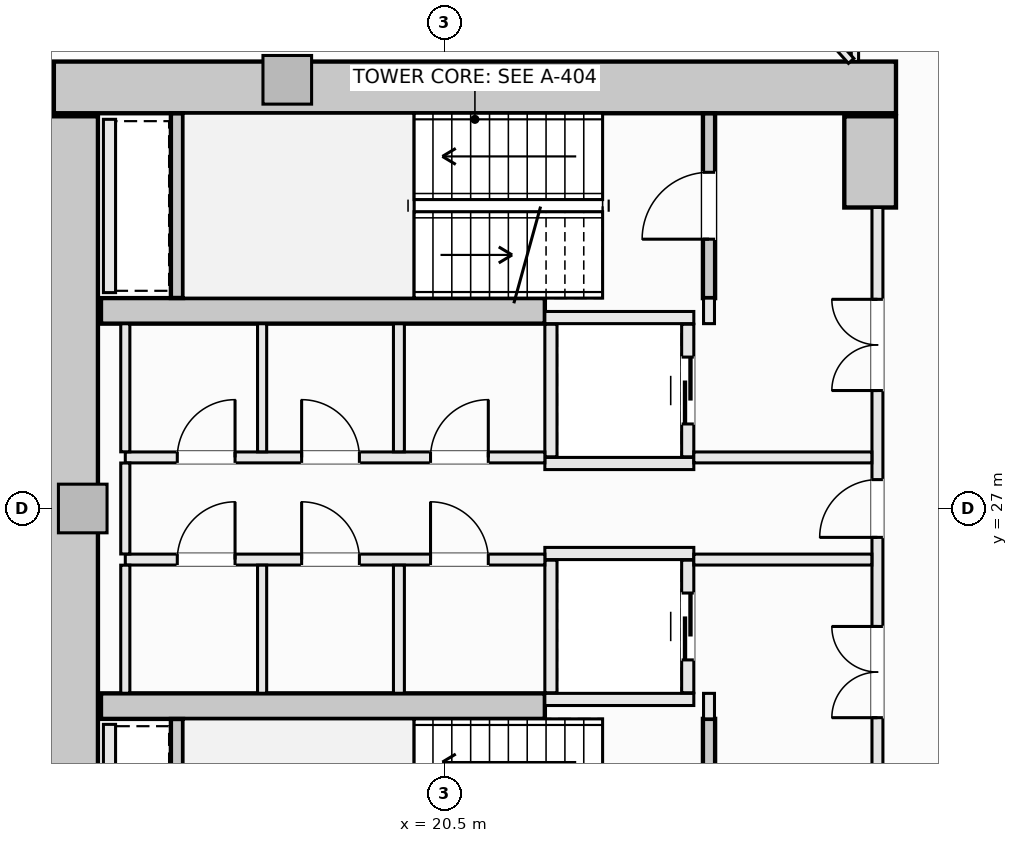
"""IFC4 building model, lengths in metres.
Left out: names, types, materials, properties, quantities, classifications, styles, units other than length and angle.
Written with IfcOpenShell. Run it as: python <this file> out.ifc"""

import sys

from ifc_helpers import new_model, si_unit, direction, frame, frame_2d, origin, origin_2d, place, context, subcontext, project, spatial, rectangle, extrude, element, fill, save


model = new_model("IFC4")
c1 = context("Model", 3, precision=1e-05, world=origin(), true_north=direction((0.0, 1.0)))
c2 = subcontext(c1, "Body", "Model", "MODEL_VIEW")
j1 = project(units=[si_unit("LENGTHUNIT", "METRE"), si_unit("PLANEANGLEUNIT", "RADIAN")], contexts=[c1])
p1 = place(None, origin())
s1 = spatial("IfcSite", under=j1, at=p1, CompositionType="ELEMENT")
p2 = place(p1, origin())
s2 = spatial("IfcBuilding", under=s1, at=p2, CompositionType="ELEMENT")
p3 = place(p2, frame((0.0, 0.0, 88.1)))
s3 = spatial("IfcBuildingStorey", under=s2, at=p3, CompositionType="ELEMENT", Elevation=88.1)
p4 = place(p3, frame((14.075, 33.925, -0.28), z_axis=(0.0, 0.0, 1.0), x_axis=(1.0, 0.0, 0.0)))
e1 = element("IfcWall", 1, at=p4, inside=s3, PredefinedType="SHEAR", context=c2, shape_type="SweptSolid", body=[
    extrude(rectangle(XDim=13.85, YDim=0.85, at=frame_2d((6.925, 0.0))), origin(), (0.0, 0.0, 1.0), 3.85),
])
p5 = place(p3, frame((14.375, 20.55, -0.28), z_axis=(0.0, 0.0, 1.0), x_axis=(0.0, 1.0, 0.0)))
e2 = element("IfcWall", 2, at=p5, inside=s3, PredefinedType="SHEAR", context=c2, shape_type="SweptSolid", body=[
    extrude(rectangle(XDim=12.9, YDim=0.85, at=frame_2d((6.45, 0.0))), origin(), (0.0, 0.0, 1.0), 3.85),
])
p6 = place(p3, frame((27.5, 31.95, -0.28), z_axis=(0.0, 0.0, 1.0), x_axis=(0.0, 1.0, 0.0)))
e3 = element("IfcWall", 3, at=p6, inside=s3, PredefinedType="SHEAR", context=c2, shape_type="SweptSolid", body=[
    extrude(rectangle(XDim=1.5, YDim=0.85, at=frame_2d((0.75, 0.0))), origin(), (0.0, 0.0, 1.0), 3.85),
])
for number, where, z_axis, x_axis in (
    (4, (14.85, 30.25, -0.28), (0.0, 0.0, 1.0), (1.0, 0.0, 0.0)),
    (5, (14.85, 23.75, -0.28), (0.0, 0.0, 1.0), (1.0, 0.0, 0.0)),
):
    element("IfcWall", number, at=place(p3, frame(where, z_axis=z_axis, x_axis=x_axis)), inside=s3, PredefinedType="SHEAR", context=c2, shape_type="SweptSolid", body=[
        extrude(rectangle(XDim=7.3, YDim=0.42, at=frame_2d((3.65, 0.0))), origin(), (0.0, 0.0, 1.0), 3.85),
    ])
for number, where, z_axis, x_axis in (
    (6, (17.914, 34.05, -0.28), (0.0, 0.0, 1.0), (1.0, 0.0, 0.0)),
    (7, (14.55, 27.0, -0.28), (0.0, 0.0, 1.0), (1.0, 0.0, 0.0)),
):
    element("IfcColumn", number, at=place(p3, frame(where, z_axis=z_axis, x_axis=x_axis)), inside=s3, PredefinedType="PILASTER", context=c2, shape_type="SweptSolid", body=[
        extrude(rectangle(XDim=0.8, YDim=0.8, at=origin_2d()), origin(), (0.0, 0.0, 1.0), 3.85),
    ])
p7 = place(p3, frame((24.85, 30.46, -0.28), z_axis=(0.0, 0.0, 1.0), x_axis=(0.0, 1.0, 0.0)))
e8 = element("IfcWall", 8, at=p7, inside=s3, PredefinedType="SHEAR", context=c2, shape_type="SweptSolid", body=[
    extrude(rectangle(XDim=3.038, YDim=0.2, at=frame_2d((1.519, 0.0))), origin(), (0.0, 0.0, 1.0), 3.85),
])
p8 = place(p7, frame((0.969, 0.0, 0.28)))
e9 = element("IfcOpeningElement", 9, at=p8, cuts=e8, PredefinedType="OPENING", context=c2, shape_type="SweptSolid", body=[
    extrude(rectangle(XDim=1.1, YDim=2.15, at=frame_2d((0.55, 1.075))), frame((0.0, 0.11, 0.0), z_axis=(0.0, -1.0, 0.0), x_axis=(1.0, 0.0, 0.0)), (0.0, 0.0, 1.0), 0.22),
])
p9 = place(p3, frame((16.1, 30.462, -0.28), z_axis=(0.0, 0.0, 1.0), x_axis=(0.0, 1.0, 0.0)))
e10 = element("IfcWall", 10, at=p9, inside=s3, PredefinedType="SHEAR", context=c2, shape_type="SweptSolid", body=[
    extrude(rectangle(XDim=3.036, YDim=0.2, at=frame_2d((1.518, 0.0))), origin(), (0.0, 0.0, 1.0), 3.85),
])
p10 = place(p3, frame((24.85, 20.502, -0.28), z_axis=(0.0, 0.0, 1.0), x_axis=(0.0, 1.0, 0.0)))
e11 = element("IfcWall", 11, at=p10, inside=s3, PredefinedType="SHEAR", context=c2, shape_type="SweptSolid", body=[
    extrude(rectangle(XDim=3.038, YDim=0.2, at=frame_2d((1.519, 0.0))), origin(), (0.0, 0.0, 1.0), 3.85),
])
p11 = place(p10, frame((0.969, 0.0, 0.28)))
e12 = element("IfcOpeningElement", 12, at=p11, cuts=e11, PredefinedType="OPENING", context=c2, shape_type="SweptSolid", body=[
    extrude(rectangle(XDim=1.1, YDim=2.15, at=frame_2d((0.55, 1.075))), frame((0.0, 0.11, 0.0), z_axis=(0.0, -1.0, 0.0), x_axis=(1.0, 0.0, 0.0)), (0.0, 0.0, 1.0), 0.22),
])
p12 = place(p3, frame((16.1, 20.502, -0.28), z_axis=(0.0, 0.0, 1.0), x_axis=(0.0, 1.0, 0.0)))
e13 = element("IfcWall", 13, at=p12, inside=s3, PredefinedType="SHEAR", context=c2, shape_type="SweptSolid", body=[
    extrude(rectangle(XDim=3.036, YDim=0.2, at=frame_2d((1.518, 0.0))), origin(), (0.0, 0.0, 1.0), 3.85),
])
for number, where, z_axis, x_axis in (
    (14, (22.15, 30.14, 0.0), (0.0, 0.0, 1.0), (1.0, 0.0, 0.0)),
    (15, (22.15, 27.74, 0.0), (0.0, 0.0, 1.0), (1.0, 0.0, 0.0)),
):
    element("IfcWall", number, at=place(p3, frame(where, z_axis=z_axis, x_axis=x_axis)), inside=s3, PredefinedType="SOLIDWALL", context=c2, shape_type="SweptSolid", body=[
        extrude(rectangle(XDim=2.45, YDim=0.2, at=frame_2d((1.225, 0.0))), origin(), (0.0, 0.0, 1.0), 3.57),
    ])
p13 = place(p3, frame((22.25, 27.85, 0.0), z_axis=(0.0, 0.0, 1.0), x_axis=(0.0, 1.0, 0.0)))
e16 = element("IfcWall", 16, at=p13, inside=s3, PredefinedType="SOLIDWALL", context=c2, shape_type="SweptSolid", body=[
    extrude(rectangle(XDim=2.18, YDim=0.2, at=frame_2d((1.09, 0.0))), origin(), (0.0, 0.0, 1.0), 3.57),
])
p14 = place(p3, frame((24.5, 27.85, 0.0), z_axis=(0.0, 0.0, 1.0), x_axis=(0.0, 1.0, 0.0)))
e17 = element("IfcWall", 17, at=p14, inside=s3, PredefinedType="SOLIDWALL", context=c2, shape_type="SweptSolid", body=[
    extrude(rectangle(XDim=2.18, YDim=0.2, at=frame_2d((1.09, 0.0))), origin(), (0.0, 0.0, 1.0), 3.57),
])
p15 = place(p14, frame((0.54, 0.0, 0.0)))
e18 = element("IfcOpeningElement", 18, at=p15, cuts=e17, PredefinedType="OPENING", context=c2, shape_type="SweptSolid", body=[
    extrude(rectangle(XDim=1.1, YDim=2.2, at=frame_2d((0.55, 1.1))), frame((0.0, 0.11, 0.0), z_axis=(0.0, -1.0, 0.0), x_axis=(1.0, 0.0, 0.0)), (0.0, 0.0, 1.0), 0.22),
])
for number, where, z_axis, x_axis in (
    (19, (22.15, 26.26, 0.0), (0.0, 0.0, 1.0), (1.0, 0.0, 0.0)),
    (20, (22.15, 23.86, 0.0), (0.0, 0.0, 1.0), (1.0, 0.0, 0.0)),
):
    element("IfcWall", number, at=place(p3, frame(where, z_axis=z_axis, x_axis=x_axis)), inside=s3, PredefinedType="SOLIDWALL", context=c2, shape_type="SweptSolid", body=[
        extrude(rectangle(XDim=2.45, YDim=0.2, at=frame_2d((1.225, 0.0))), origin(), (0.0, 0.0, 1.0), 3.57),
    ])
p16 = place(p3, frame((22.25, 23.97, 0.0), z_axis=(0.0, 0.0, 1.0), x_axis=(0.0, 1.0, 0.0)))
e21 = element("IfcWall", 21, at=p16, inside=s3, PredefinedType="SOLIDWALL", context=c2, shape_type="SweptSolid", body=[
    extrude(rectangle(XDim=2.18, YDim=0.2, at=frame_2d((1.09, 0.0))), origin(), (0.0, 0.0, 1.0), 3.57),
])
p17 = place(p3, frame((24.5, 23.97, 0.0), z_axis=(0.0, 0.0, 1.0), x_axis=(0.0, 1.0, 0.0)))
e22 = element("IfcWall", 22, at=p17, inside=s3, PredefinedType="SOLIDWALL", context=c2, shape_type="SweptSolid", body=[
    extrude(rectangle(XDim=2.18, YDim=0.2, at=frame_2d((1.09, 0.0))), origin(), (0.0, 0.0, 1.0), 3.57),
])
p18 = place(p17, frame((0.54, 0.0, 0.0)))
e23 = element("IfcOpeningElement", 23, at=p18, cuts=e22, PredefinedType="OPENING", context=c2, shape_type="SweptSolid", body=[
    extrude(rectangle(XDim=1.1, YDim=2.2, at=frame_2d((0.55, 1.1))), frame((0.0, 0.11, 0.0), z_axis=(0.0, -1.0, 0.0), x_axis=(1.0, 0.0, 0.0)), (0.0, 0.0, 1.0), 0.22),
])
for number, where, z_axis, x_axis in (
    (24, (14.99, 30.55, 0.0), (0.0, 0.0, 1.0), (0.0, 1.0, 0.0)),
    (25, (14.99, 20.6, 0.0), (0.0, 0.0, 1.0), (0.0, 1.0, 0.0)),
):
    element("IfcWall", number, at=place(p3, frame(where, z_axis=z_axis, x_axis=x_axis)), inside=s3, PredefinedType="SOLIDWALL", context=c2, shape_type="SweptSolid", body=[
        extrude(rectangle(XDim=2.85, YDim=0.2, at=frame_2d((1.425, 0.0))), origin(), (0.0, 0.0, 1.0), 3.57),
    ])
for number, where, z_axis, x_axis in (
    (26, (24.85, 23.54, 0.0), (0.0, 0.0, 1.0), (0.0, 1.0, 0.0)),
    (27, (24.85, 30.04, 0.0), (0.0, 0.0, 1.0), (0.0, 1.0, 0.0)),
):
    element("IfcWall", number, at=place(p3, frame(where, z_axis=z_axis, x_axis=x_axis)), inside=s3, PredefinedType="SOLIDWALL", context=c2, shape_type="SweptSolid", body=[
        extrude(rectangle(XDim=0.42, YDim=0.18, at=frame_2d((0.21, 0.0))), origin(), (0.0, 0.0, 1.0), 3.57),
    ])
p19 = place(p3, frame((27.62, 22.05, 0.0), z_axis=(0.0, 0.0, 1.0), x_axis=(0.0, 1.0, 0.0)))
e28 = element("IfcWall", 28, at=p19, inside=s3, PredefinedType="SOLIDWALL", context=c2, shape_type="SweptSolid", body=[
    extrude(rectangle(XDim=9.9, YDim=0.18, at=frame_2d((4.95, 0.0))), origin(), (0.0, 0.0, 1.0), 2.662),
])
p20 = place(p19, frame((4.475, 0.0, 0.0)))
e29 = element("IfcOpeningElement", 29, at=p20, cuts=e28, PredefinedType="OPENING", context=c2, shape_type="SweptSolid", body=[
    extrude(rectangle(XDim=0.95, YDim=2.1, at=frame_2d((0.475, 1.05))), frame((0.0, 0.1, 0.0), z_axis=(0.0, -1.0, 0.0), x_axis=(1.0, 0.0, 0.0)), (0.0, 0.0, 1.0), 0.2),
])
p21 = place(p19, frame((6.89, 0.0, 0.0)))
e30 = element("IfcOpeningElement", 30, at=p21, cuts=e28, PredefinedType="OPENING", context=c2, shape_type="SweptSolid", body=[
    extrude(rectangle(XDim=1.5, YDim=2.2, at=frame_2d((0.75, 1.1))), frame((0.0, 0.1, 0.0), z_axis=(0.0, -1.0, 0.0), x_axis=(1.0, 0.0, 0.0)), (0.0, 0.0, 1.0), 0.2),
])
p22 = place(p19, frame((1.51, 0.0, 0.0)))
e31 = element("IfcOpeningElement", 31, at=p22, cuts=e28, PredefinedType="OPENING", context=c2, shape_type="SweptSolid", body=[
    extrude(rectangle(XDim=1.5, YDim=2.2, at=frame_2d((0.75, 1.1))), frame((0.0, 0.1, 0.0), z_axis=(0.0, -1.0, 0.0), x_axis=(1.0, 0.0, 0.0)), (0.0, 0.0, 1.0), 0.2),
])
p23 = place(p3, frame((15.25, 27.84, 0.0), z_axis=(0.0, 0.0, 1.0), x_axis=(1.0, 0.0, 0.0)))
e32 = element("IfcWall", 32, at=p23, inside=s3, PredefinedType="SOLIDWALL", context=c2, shape_type="SweptSolid", body=[
    extrude(rectangle(XDim=6.9, YDim=0.18, at=frame_2d((3.45, 0.0))), origin(), (0.0, 0.0, 1.0), 3.57),
])
p24 = place(p23, frame((5.02, 0.0, 0.0)))
e33 = element("IfcOpeningElement", 33, at=p24, cuts=e32, PredefinedType="OPENING", context=c2, shape_type="SweptSolid", body=[
    extrude(rectangle(XDim=0.95, YDim=2.1, at=frame_2d((0.475, 1.05))), frame((0.0, 0.1, 0.0), z_axis=(0.0, -1.0, 0.0), x_axis=(1.0, 0.0, 0.0)), (0.0, 0.0, 1.0), 0.2),
])
p25 = place(p23, frame((0.855, 0.0, 0.0)))
e34 = element("IfcOpeningElement", 34, at=p25, cuts=e32, PredefinedType="OPENING", context=c2, shape_type="SweptSolid", body=[
    extrude(rectangle(XDim=0.95, YDim=2.1, at=frame_2d((0.475, 1.05))), frame((0.0, 0.1, 0.0), z_axis=(0.0, -1.0, 0.0), x_axis=(1.0, 0.0, 0.0)), (0.0, 0.0, 1.0), 0.2),
])
p26 = place(p23, frame((2.9, 0.0, 0.0)))
e35 = element("IfcOpeningElement", 35, at=p26, cuts=e32, PredefinedType="OPENING", context=c2, shape_type="SweptSolid", body=[
    extrude(rectangle(XDim=0.95, YDim=2.1, at=frame_2d((0.475, 1.05))), frame((0.0, 0.1, 0.0), z_axis=(0.0, -1.0, 0.0), x_axis=(1.0, 0.0, 0.0)), (0.0, 0.0, 1.0), 0.2),
])
p27 = place(p3, frame((24.6, 27.84, 0.0), z_axis=(0.0, 0.0, 1.0), x_axis=(1.0, 0.0, 0.0)))
e36 = element("IfcWall", 36, at=p27, inside=s3, PredefinedType="SOLIDWALL", context=c2, shape_type="SweptSolid", body=[
    extrude(rectangle(XDim=2.928, YDim=0.18, at=frame_2d((1.464, 0.0))), origin(), (0.0, 0.0, 1.0), 3.57),
])
p28 = place(p3, frame((15.25, 26.16, 0.0), z_axis=(0.0, 0.0, 1.0), x_axis=(1.0, 0.0, 0.0)))
e37 = element("IfcWall", 37, at=p28, inside=s3, PredefinedType="SOLIDWALL", context=c2, shape_type="SweptSolid", body=[
    extrude(rectangle(XDim=6.9, YDim=0.18, at=frame_2d((3.45, 0.0))), origin(), (0.0, 0.0, 1.0), 3.57),
])
p29 = place(p28, frame((5.02, 0.0, 0.0)))
e38 = element("IfcOpeningElement", 38, at=p29, cuts=e37, PredefinedType="OPENING", context=c2, shape_type="SweptSolid", body=[
    extrude(rectangle(XDim=0.95, YDim=2.1, at=frame_2d((0.475, 1.05))), frame((0.0, 0.1, 0.0), z_axis=(0.0, -1.0, 0.0), x_axis=(1.0, 0.0, 0.0)), (0.0, 0.0, 1.0), 0.2),
])
p30 = place(p28, frame((0.855, 0.0, 0.0)))
e39 = element("IfcOpeningElement", 39, at=p30, cuts=e37, PredefinedType="OPENING", context=c2, shape_type="SweptSolid", body=[
    extrude(rectangle(XDim=0.95, YDim=2.1, at=frame_2d((0.475, 1.05))), frame((0.0, 0.1, 0.0), z_axis=(0.0, -1.0, 0.0), x_axis=(1.0, 0.0, 0.0)), (0.0, 0.0, 1.0), 0.2),
])
p31 = place(p28, frame((2.9, 0.0, 0.0)))
e40 = element("IfcOpeningElement", 40, at=p31, cuts=e37, PredefinedType="OPENING", context=c2, shape_type="SweptSolid", body=[
    extrude(rectangle(XDim=0.95, YDim=2.1, at=frame_2d((0.475, 1.05))), frame((0.0, 0.1, 0.0), z_axis=(0.0, -1.0, 0.0), x_axis=(1.0, 0.0, 0.0)), (0.0, 0.0, 1.0), 0.2),
])
p32 = place(p3, frame((24.6, 26.16, 0.0), z_axis=(0.0, 0.0, 1.0), x_axis=(1.0, 0.0, 0.0)))
e41 = element("IfcWall", 41, at=p32, inside=s3, PredefinedType="SOLIDWALL", context=c2, shape_type="SweptSolid", body=[
    extrude(rectangle(XDim=2.928, YDim=0.18, at=frame_2d((1.464, 0.0))), origin(), (0.0, 0.0, 1.0), 3.57),
])
p33 = place(p3, frame((15.25, 23.962, 0.0), z_axis=(0.0, 0.0, 1.0), x_axis=(0.0, 1.0, 0.0)))
e42 = element("IfcWall", 42, at=p33, inside=s3, PredefinedType="PARTITIONING", context=c2, shape_type="SweptSolid", body=[
    extrude(rectangle(XDim=2.106, YDim=0.15, at=frame_2d((1.053, 0.0))), origin(), (0.0, 0.0, 1.0), 3.57),
])
p34 = place(p3, frame((15.25, 26.252, 0.0), z_axis=(0.0, 0.0, 1.0), x_axis=(0.0, 1.0, 0.0)))
e43 = element("IfcWall", 43, at=p34, inside=s3, PredefinedType="PARTITIONING", context=c2, shape_type="SweptSolid", body=[
    extrude(rectangle(XDim=1.496, YDim=0.15, at=frame_2d((0.748, 0.0))), origin(), (0.0, 0.0, 1.0), 3.57),
])
p35 = place(p3, frame((15.25, 27.932, 0.0), z_axis=(0.0, 0.0, 1.0), x_axis=(0.0, 1.0, 0.0)))
e44 = element("IfcWall", 44, at=p35, inside=s3, PredefinedType="PARTITIONING", context=c2, shape_type="SweptSolid", body=[
    extrude(rectangle(XDim=2.106, YDim=0.15, at=frame_2d((1.053, 0.0))), origin(), (0.0, 0.0, 1.0), 3.57),
])
for number, where, z_axis, x_axis in (
    (45, (19.75, 23.962, 0.0), (0.0, 0.0, 1.0), (0.0, 1.0, 0.0)),
    (46, (19.75, 27.932, 0.0), (0.0, 0.0, 1.0), (0.0, 1.0, 0.0)),
):
    element("IfcWall", number, at=place(p3, frame(where, z_axis=z_axis, x_axis=x_axis)), inside=s3, PredefinedType="SOLIDWALL", context=c2, shape_type="SweptSolid", body=[
        extrude(rectangle(XDim=2.106, YDim=0.18, at=frame_2d((1.053, 0.0))), origin(), (0.0, 0.0, 1.0), 3.57),
    ])
for number, where, z_axis, x_axis in (
    (47, (17.5, 23.962, 0.0), (0.0, 0.0, 1.0), (0.0, 1.0, 0.0)),
    (48, (17.5, 27.932, 0.0), (0.0, 0.0, 1.0), (0.0, 1.0, 0.0)),
):
    element("IfcWall", number, at=place(p3, frame(where, z_axis=z_axis, x_axis=x_axis)), inside=s3, PredefinedType="PARTITIONING", context=c2, shape_type="SweptSolid", body=[
        extrude(rectangle(XDim=2.106, YDim=0.15, at=frame_2d((1.053, 0.0))), origin(), (0.0, 0.0, 1.0), 3.57),
    ])
p36 = place(p3, frame((27.25, 34.352, 0.0), z_axis=(0.0, 0.0, 1.0), x_axis=(0.0, 1.0, 0.0)))
e49 = element("IfcWall", 49, at=p36, inside=s3, PredefinedType="PARTITIONING", context=c2, shape_type="SweptSolid", body=[
    extrude(rectangle(XDim=0.606, YDim=0.12, at=frame_2d((0.303, 0.0))), origin(), (0.0, 0.0, 1.0), 3.57),
])
p37 = place(p3, frame((26.651, 34.958, 0.0), z_axis=(0.0, 0.0, 1.0), x_axis=(0.668729584791, -0.743505711091, 0.0)))
e50 = element("IfcWall", 50, at=p37, inside=s3, PredefinedType="PARTITIONING", context=c2, shape_type="SweptSolid", body=[
    extrude(rectangle(XDim=0.803, YDim=0.12, at=frame_2d((0.402, 0.0))), origin(), (0.0, 0.0, 1.0), 3.57),
])
p38 = place(p8, origin())
e51 = element("IfcDoor", 51, at=p38, inside=s3, OperationType="SINGLE_SWING_LEFT", PredefinedType="DOOR", context=c2, shape_type="SweptSolid", body=[
    extrude(rectangle(XDim=1.1, YDim=2.15, at=frame_2d((0.55, 1.075))), frame((0.0, 0.025, 0.0), z_axis=(0.0, -1.0, 0.0), x_axis=(1.0, 0.0, 0.0)), (0.0, 0.0, 1.0), 0.05),
])
fill(e9, e51)
p39 = place(p15, origin())
e52 = element("IfcDoor", 52, at=p39, inside=s3, OperationType="SLIDING_TO_LEFT", PredefinedType="DOOR", context=c2, shape_type="SweptSolid", body=[
    extrude(rectangle(XDim=1.1, YDim=2.2, at=frame_2d((0.55, 1.1))), frame((0.0, 0.025, 0.0), z_axis=(0.0, -1.0, 0.0), x_axis=(1.0, 0.0, 0.0)), (0.0, 0.0, 1.0), 0.05),
])
fill(e18, e52)
p40 = place(p18, origin())
e53 = element("IfcDoor", 53, at=p40, inside=s3, OperationType="SLIDING_TO_LEFT", PredefinedType="DOOR", context=c2, shape_type="SweptSolid", body=[
    extrude(rectangle(XDim=1.1, YDim=2.2, at=frame_2d((0.55, 1.1))), frame((0.0, 0.025, 0.0), z_axis=(0.0, -1.0, 0.0), x_axis=(1.0, 0.0, 0.0)), (0.0, 0.0, 1.0), 0.05),
])
fill(e23, e53)
p41 = place(p20, origin())
e54 = element("IfcDoor", 54, at=p41, inside=s3, OperationType="SINGLE_SWING_LEFT", PredefinedType="DOOR", context=c2, shape_type="SweptSolid", body=[
    extrude(rectangle(XDim=0.95, YDim=2.1, at=frame_2d((0.475, 1.05))), frame((0.0, 0.025, 0.0), z_axis=(0.0, -1.0, 0.0), x_axis=(1.0, 0.0, 0.0)), (0.0, 0.0, 1.0), 0.05),
])
fill(e29, e54)
p42 = place(p21, origin())
e55 = element("IfcDoor", 55, at=p42, inside=s3, OperationType="DOUBLE_DOOR_SINGLE_SWING", PredefinedType="DOOR", context=c2, shape_type="SweptSolid", body=[
    extrude(rectangle(XDim=1.5, YDim=2.2, at=frame_2d((0.75, 1.1))), frame((0.0, 0.025, 0.0), z_axis=(0.0, -1.0, 0.0), x_axis=(1.0, 0.0, 0.0)), (0.0, 0.0, 1.0), 0.05),
])
fill(e30, e55)
p43 = place(p22, origin())
e56 = element("IfcDoor", 56, at=p43, inside=s3, OperationType="DOUBLE_DOOR_SINGLE_SWING", PredefinedType="DOOR", context=c2, shape_type="SweptSolid", body=[
    extrude(rectangle(XDim=1.5, YDim=2.2, at=frame_2d((0.75, 1.1))), frame((0.0, 0.025, 0.0), z_axis=(0.0, -1.0, 0.0), x_axis=(1.0, 0.0, 0.0)), (0.0, 0.0, 1.0), 0.05),
])
fill(e31, e56)
p44 = place(p24, origin())
e57 = element("IfcDoor", 57, at=p44, inside=s3, OperationType="SINGLE_SWING_RIGHT", PredefinedType="DOOR", context=c2, shape_type="SweptSolid", body=[
    extrude(rectangle(XDim=0.95, YDim=2.1, at=frame_2d((0.475, 1.05))), frame((0.0, 0.025, 0.0), z_axis=(0.0, -1.0, 0.0), x_axis=(1.0, 0.0, 0.0)), (0.0, 0.0, 1.0), 0.05),
])
fill(e33, e57)
p45 = place(p29, origin())
e58 = element("IfcDoor", 58, at=p45, inside=s3, OperationType="SINGLE_SWING_LEFT", PredefinedType="DOOR", context=c2, shape_type="SweptSolid", body=[
    extrude(rectangle(XDim=0.95, YDim=2.1, at=frame_2d((0.475, 1.05))), frame((0.0, 0.025, 0.0), z_axis=(0.0, -1.0, 0.0), x_axis=(1.0, 0.0, 0.0)), (0.0, 0.0, 1.0), 0.05),
])
fill(e38, e58)
p46 = place(p25, origin())
e59 = element("IfcDoor", 59, at=p46, inside=s3, OperationType="SINGLE_SWING_RIGHT", PredefinedType="DOOR", context=c2, shape_type="SweptSolid", body=[
    extrude(rectangle(XDim=0.95, YDim=2.1, at=frame_2d((0.475, 1.05))), frame((0.0, 0.025, 0.0), z_axis=(0.0, -1.0, 0.0), x_axis=(1.0, 0.0, 0.0)), (0.0, 0.0, 1.0), 0.05),
])
fill(e34, e59)
p47 = place(p26, origin())
e60 = element("IfcDoor", 60, at=p47, inside=s3, OperationType="SINGLE_SWING_LEFT", PredefinedType="DOOR", context=c2, shape_type="SweptSolid", body=[
    extrude(rectangle(XDim=0.95, YDim=2.1, at=frame_2d((0.475, 1.05))), frame((0.0, 0.025, 0.0), z_axis=(0.0, -1.0, 0.0), x_axis=(1.0, 0.0, 0.0)), (0.0, 0.0, 1.0), 0.05),
])
fill(e35, e60)
p48 = place(p30, origin())
e61 = element("IfcDoor", 61, at=p48, inside=s3, OperationType="SINGLE_SWING_RIGHT", PredefinedType="DOOR", context=c2, shape_type="SweptSolid", body=[
    extrude(rectangle(XDim=0.95, YDim=2.1, at=frame_2d((0.475, 1.05))), frame((0.0, 0.025, 0.0), z_axis=(0.0, -1.0, 0.0), x_axis=(1.0, 0.0, 0.0)), (0.0, 0.0, 1.0), 0.05),
])
fill(e39, e61)
p49 = place(p31, origin())
e62 = element("IfcDoor", 62, at=p49, inside=s3, OperationType="SINGLE_SWING_LEFT", PredefinedType="DOOR", context=c2, shape_type="SweptSolid", body=[
    extrude(rectangle(XDim=0.95, YDim=2.1, at=frame_2d((0.475, 1.05))), frame((0.0, 0.025, 0.0), z_axis=(0.0, -1.0, 0.0), x_axis=(1.0, 0.0, 0.0)), (0.0, 0.0, 1.0), 0.05),
])
fill(e40, e62)
save(model, sys.argv[1])
